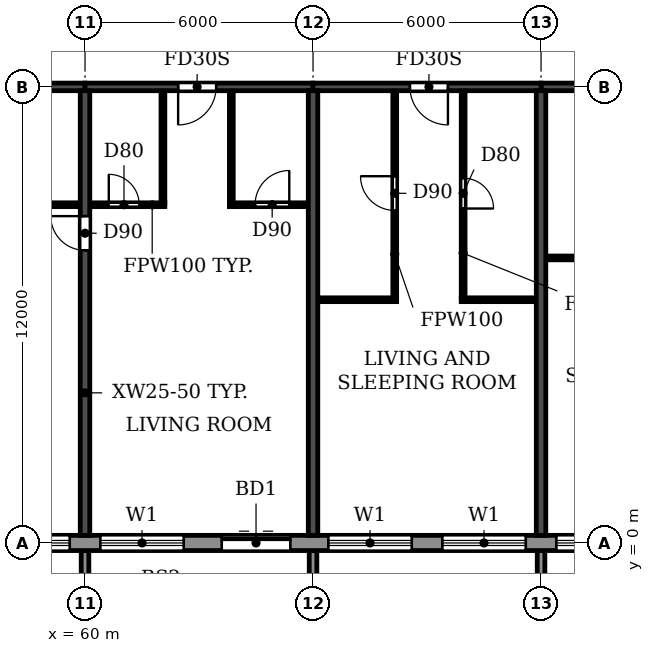
"""IFC4 building model, lengths in metres.
Left out: names, types, materials, properties, quantities, classifications, styles, units other than length and angle.
Written with IfcOpenShell. Run it as: python <this file> out.ifc"""

import sys

from ifc_helpers import new_model, si_unit, direction, frame, frame_2d, origin, place, context, subcontext, project, spatial, polyline, rectangle, outline, extrude, source, transform, mapped, element, fill, save


model = new_model("IFC4")
c1 = context("Model", 3, precision=1e-05, world=origin(), true_north=direction((0.0, 1.0)))
c2 = subcontext(c1, "Body", "Model", "MODEL_VIEW")
j1 = project(units=[si_unit("LENGTHUNIT", "METRE"), si_unit("PLANEANGLEUNIT", "RADIAN")], contexts=[c1])
p1 = place(None, origin())
s1 = spatial("IfcSite", under=j1, at=p1, CompositionType="ELEMENT")
p2 = place(p1, origin())
s2 = spatial("IfcBuilding", under=s1, at=p2, CompositionType="ELEMENT")
p3 = place(p2, frame((0.0, 0.0, 171.9)))
s3 = spatial("IfcBuildingStorey", under=s2, at=p3, CompositionType="ELEMENT", Elevation=171.9)
p4 = place(p3, frame((60.0, 0.2, 0.0), z_axis=(0.0, 0.0, 1.0), x_axis=(0.0, 1.0, 0.0)))
e1 = element("IfcWall", 1, at=p4, inside=s3, PredefinedType="SHEAR", context=c2, shape_type="SweptSolid", body=[
    extrude(rectangle(XDim=11.7, YDim=0.25, at=frame_2d((5.85, 0.0))), origin(), (0.0, 0.0, 1.0), 3.08),
])
p5 = place(p4, frame((7.5, 0.0, 0.0)))
e2 = element("IfcOpeningElement", 2, at=p5, cuts=e1, PredefinedType="OPENING", context=c2, shape_type="SweptSolid", body=[
    extrude(rectangle(XDim=0.9, YDim=2.1, at=frame_2d((0.45, 1.05))), frame((0.0, 0.135, 0.0), z_axis=(0.0, -1.0, 0.0), x_axis=(1.0, 0.0, 0.0)), (0.0, 0.0, 1.0), 0.27),
])
for number, where, z_axis, x_axis in (
    (3, (66.0, 0.2, 0.0), (0.0, 0.0, 1.0), (0.0, 1.0, 0.0)),
    (4, (72.0, 0.2, 0.0), (0.0, 0.0, 1.0), (0.0, 1.0, 0.0)),
):
    element("IfcWall", number, at=place(p3, frame(where, z_axis=z_axis, x_axis=x_axis)), inside=s3, PredefinedType="SHEAR", context=c2, shape_type="SweptSolid", body=[
        extrude(rectangle(XDim=11.7, YDim=0.25, at=frame_2d((5.85, 0.0))), origin(), (0.0, 0.0, 1.0), 3.08),
    ])
p6 = place(p3, frame((54.0, 12.0, 0.0), z_axis=(0.0, 0.0, 1.0), x_axis=(1.0, 0.0, 0.0)))
e5 = element("IfcWall", 5, at=p6, inside=s3, PredefinedType="SHEAR", context=c2, shape_type="SweptSolid", body=[
    extrude(rectangle(XDim=6.0, YDim=0.2, at=frame_2d((3.0, 0.0))), origin(), (0.0, 0.0, 1.0), 2.48),
])
p7 = place(p3, frame((60.0, 12.0, 0.0), z_axis=(0.0, 0.0, 1.0), x_axis=(1.0, 0.0, 0.0)))
e6 = element("IfcWall", 6, at=p7, inside=s3, PredefinedType="SHEAR", context=c2, shape_type="SweptSolid", body=[
    extrude(rectangle(XDim=6.0, YDim=0.2, at=frame_2d((3.0, 0.0))), origin(), (0.0, 0.0, 1.0), 2.48),
])
p8 = place(p7, frame((2.45, 0.0, 0.0)))
e7 = element("IfcOpeningElement", 7, at=p8, cuts=e6, PredefinedType="OPENING", context=c2, shape_type="SweptSolid", body=[
    extrude(rectangle(XDim=1.0, YDim=2.1, at=frame_2d((0.5, 1.05))), frame((0.0, 0.11, 0.0), z_axis=(0.0, -1.0, 0.0), x_axis=(1.0, 0.0, 0.0)), (0.0, 0.0, 1.0), 0.22),
])
p9 = place(p3, frame((66.0, 12.0, 0.0), z_axis=(0.0, 0.0, 1.0), x_axis=(1.0, 0.0, 0.0)))
e8 = element("IfcWall", 8, at=p9, inside=s3, PredefinedType="SHEAR", context=c2, shape_type="SweptSolid", body=[
    extrude(rectangle(XDim=6.0, YDim=0.2, at=frame_2d((3.0, 0.0))), origin(), (0.0, 0.0, 1.0), 2.48),
])
p10 = place(p9, frame((2.55, 0.0, 0.0)))
e9 = element("IfcOpeningElement", 9, at=p10, cuts=e8, PredefinedType="OPENING", context=c2, shape_type="SweptSolid", body=[
    extrude(rectangle(XDim=1.0, YDim=2.1, at=frame_2d((0.5, 1.05))), frame((0.0, 0.11, 0.0), z_axis=(0.0, -1.0, 0.0), x_axis=(1.0, 0.0, 0.0)), (0.0, 0.0, 1.0), 0.22),
])
p11 = place(p3, frame((72.0, 12.0, 0.0), z_axis=(0.0, 0.0, 1.0), x_axis=(1.0, 0.0, 0.0)))
e10 = element("IfcWall", 10, at=p11, inside=s3, PredefinedType="SHEAR", context=c2, shape_type="SweptSolid", body=[
    extrude(rectangle(XDim=6.0, YDim=0.2, at=frame_2d((3.0, 0.0))), origin(), (0.0, 0.0, 1.0), 2.48),
])
p12 = place(p11, frame((2.45, 0.0, 0.0)))
e11 = element("IfcOpeningElement", 11, at=p12, cuts=e10, PredefinedType="OPENING", context=c2, shape_type="SweptSolid", body=[
    extrude(rectangle(XDim=1.0, YDim=2.1, at=frame_2d((0.5, 1.05))), frame((0.0, 0.11, 0.0), z_axis=(0.0, -1.0, 0.0), x_axis=(1.0, 0.0, 0.0)), (0.0, 0.0, 1.0), 0.22),
])
p13 = place(p3, frame((22.683, 0.0, 0.0), z_axis=(0.0, 0.0, 1.0), x_axis=(1.0, 0.0, 0.0)))
e12 = element("IfcWall", 12, at=p13, inside=s3, PredefinedType="STANDARD", context=c2, shape_type="SweptSolid", body=[
    extrude(rectangle(XDim=56.634, YDim=0.4, at=frame_2d((28.317, 0.0))), origin(), (0.0, 0.0, 1.0), 3.08),
])
p14 = place(p13, frame((1.717, 0.0, 0.9)))
e13 = element("IfcOpeningElement", 13, at=p14, cuts=e12, PredefinedType="OPENING", context=c2, shape_type="SweptSolid", body=[
    extrude(rectangle(XDim=2.2, YDim=1.5, at=frame_2d((1.1, 0.75))), frame((0.0, 0.21, 0.0), z_axis=(0.0, -1.0, 0.0), x_axis=(1.0, 0.0, 0.0)), (0.0, 0.0, 1.0), 0.42),
])
p15 = place(p13, frame((4.917, 0.0, 0.0)))
e14 = element("IfcOpeningElement", 14, at=p15, cuts=e12, PredefinedType="OPENING", context=c2, shape_type="SweptSolid", body=[
    extrude(rectangle(XDim=1.8, YDim=2.4, at=frame_2d((0.9, 1.2))), frame((0.0, 0.21, 0.0), z_axis=(0.0, -1.0, 0.0), x_axis=(1.0, 0.0, 0.0)), (0.0, 0.0, 1.0), 0.42),
])
p16 = place(p13, frame((7.717, 0.0, 0.9)))
e15 = element("IfcOpeningElement", 15, at=p16, cuts=e12, PredefinedType="OPENING", context=c2, shape_type="SweptSolid", body=[
    extrude(rectangle(XDim=2.2, YDim=1.5, at=frame_2d((1.1, 0.75))), frame((0.0, 0.21, 0.0), z_axis=(0.0, -1.0, 0.0), x_axis=(1.0, 0.0, 0.0)), (0.0, 0.0, 1.0), 0.42),
])
p17 = place(p13, frame((10.717, 0.0, 0.9)))
e16 = element("IfcOpeningElement", 16, at=p17, cuts=e12, PredefinedType="OPENING", context=c2, shape_type="SweptSolid", body=[
    extrude(rectangle(XDim=2.2, YDim=1.5, at=frame_2d((1.1, 0.75))), frame((0.0, 0.21, 0.0), z_axis=(0.0, -1.0, 0.0), x_axis=(1.0, 0.0, 0.0)), (0.0, 0.0, 1.0), 0.42),
])
p18 = place(p13, frame((13.717, 0.0, 0.9)))
e17 = element("IfcOpeningElement", 17, at=p18, cuts=e12, PredefinedType="OPENING", context=c2, shape_type="SweptSolid", body=[
    extrude(rectangle(XDim=2.2, YDim=1.5, at=frame_2d((1.1, 0.75))), frame((0.0, 0.21, 0.0), z_axis=(0.0, -1.0, 0.0), x_axis=(1.0, 0.0, 0.0)), (0.0, 0.0, 1.0), 0.42),
])
p19 = place(p13, frame((16.917, 0.0, 0.0)))
e18 = element("IfcOpeningElement", 18, at=p19, cuts=e12, PredefinedType="OPENING", context=c2, shape_type="SweptSolid", body=[
    extrude(rectangle(XDim=1.8, YDim=2.4, at=frame_2d((0.9, 1.2))), frame((0.0, 0.21, 0.0), z_axis=(0.0, -1.0, 0.0), x_axis=(1.0, 0.0, 0.0)), (0.0, 0.0, 1.0), 0.42),
])
p20 = place(p13, frame((19.717, 0.0, 0.9)))
e19 = element("IfcOpeningElement", 19, at=p20, cuts=e12, PredefinedType="OPENING", context=c2, shape_type="SweptSolid", body=[
    extrude(rectangle(XDim=2.2, YDim=1.5, at=frame_2d((1.1, 0.75))), frame((0.0, 0.21, 0.0), z_axis=(0.0, -1.0, 0.0), x_axis=(1.0, 0.0, 0.0)), (0.0, 0.0, 1.0), 0.42),
])
p21 = place(p13, frame((22.717, 0.0, 0.9)))
e20 = element("IfcOpeningElement", 20, at=p21, cuts=e12, PredefinedType="OPENING", context=c2, shape_type="SweptSolid", body=[
    extrude(rectangle(XDim=2.2, YDim=1.5, at=frame_2d((1.1, 0.75))), frame((0.0, 0.21, 0.0), z_axis=(0.0, -1.0, 0.0), x_axis=(1.0, 0.0, 0.0)), (0.0, 0.0, 1.0), 0.42),
])
p22 = place(p13, frame((25.917, 0.0, 0.0)))
e21 = element("IfcOpeningElement", 21, at=p22, cuts=e12, PredefinedType="OPENING", context=c2, shape_type="SweptSolid", body=[
    extrude(rectangle(XDim=1.8, YDim=2.4, at=frame_2d((0.9, 1.2))), frame((0.0, 0.21, 0.0), z_axis=(0.0, -1.0, 0.0), x_axis=(1.0, 0.0, 0.0)), (0.0, 0.0, 1.0), 0.42),
])
p23 = place(p13, frame((28.717, 0.0, 0.9)))
e22 = element("IfcOpeningElement", 22, at=p23, cuts=e12, PredefinedType="OPENING", context=c2, shape_type="SweptSolid", body=[
    extrude(rectangle(XDim=2.2, YDim=1.5, at=frame_2d((1.1, 0.75))), frame((0.0, 0.21, 0.0), z_axis=(0.0, -1.0, 0.0), x_axis=(1.0, 0.0, 0.0)), (0.0, 0.0, 1.0), 0.42),
])
p24 = place(p13, frame((31.717, 0.0, 0.9)))
e23 = element("IfcOpeningElement", 23, at=p24, cuts=e12, PredefinedType="OPENING", context=c2, shape_type="SweptSolid", body=[
    extrude(rectangle(XDim=2.2, YDim=1.5, at=frame_2d((1.1, 0.75))), frame((0.0, 0.21, 0.0), z_axis=(0.0, -1.0, 0.0), x_axis=(1.0, 0.0, 0.0)), (0.0, 0.0, 1.0), 0.42),
])
p25 = place(p13, frame((34.717, 0.0, 0.9)))
e24 = element("IfcOpeningElement", 24, at=p25, cuts=e12, PredefinedType="OPENING", context=c2, shape_type="SweptSolid", body=[
    extrude(rectangle(XDim=2.2, YDim=1.5, at=frame_2d((1.1, 0.75))), frame((0.0, 0.21, 0.0), z_axis=(0.0, -1.0, 0.0), x_axis=(1.0, 0.0, 0.0)), (0.0, 0.0, 1.0), 0.42),
])
p26 = place(p13, frame((37.717, 0.0, 0.9)))
e25 = element("IfcOpeningElement", 25, at=p26, cuts=e12, PredefinedType="OPENING", context=c2, shape_type="SweptSolid", body=[
    extrude(rectangle(XDim=2.2, YDim=1.5, at=frame_2d((1.1, 0.75))), frame((0.0, 0.21, 0.0), z_axis=(0.0, -1.0, 0.0), x_axis=(1.0, 0.0, 0.0)), (0.0, 0.0, 1.0), 0.42),
])
p27 = place(p13, frame((40.917, 0.0, 0.0)))
e26 = element("IfcOpeningElement", 26, at=p27, cuts=e12, PredefinedType="OPENING", context=c2, shape_type="SweptSolid", body=[
    extrude(rectangle(XDim=1.8, YDim=2.4, at=frame_2d((0.9, 1.2))), frame((0.0, 0.21, 0.0), z_axis=(0.0, -1.0, 0.0), x_axis=(1.0, 0.0, 0.0)), (0.0, 0.0, 1.0), 0.42),
])
p28 = place(p13, frame((43.717, 0.0, 0.9)))
e27 = element("IfcOpeningElement", 27, at=p28, cuts=e12, PredefinedType="OPENING", context=c2, shape_type="SweptSolid", body=[
    extrude(rectangle(XDim=2.2, YDim=1.5, at=frame_2d((1.1, 0.75))), frame((0.0, 0.21, 0.0), z_axis=(0.0, -1.0, 0.0), x_axis=(1.0, 0.0, 0.0)), (0.0, 0.0, 1.0), 0.42),
])
p29 = place(p13, frame((46.717, 0.0, 0.9)))
e28 = element("IfcOpeningElement", 28, at=p29, cuts=e12, PredefinedType="OPENING", context=c2, shape_type="SweptSolid", body=[
    extrude(rectangle(XDim=2.2, YDim=1.5, at=frame_2d((1.1, 0.75))), frame((0.0, 0.21, 0.0), z_axis=(0.0, -1.0, 0.0), x_axis=(1.0, 0.0, 0.0)), (0.0, 0.0, 1.0), 0.42),
])
p30 = place(p13, frame((49.717, 0.0, 0.9)))
e29 = element("IfcOpeningElement", 29, at=p30, cuts=e12, PredefinedType="OPENING", context=c2, shape_type="SweptSolid", body=[
    extrude(rectangle(XDim=2.2, YDim=1.5, at=frame_2d((1.1, 0.75))), frame((0.0, 0.21, 0.0), z_axis=(0.0, -1.0, 0.0), x_axis=(1.0, 0.0, 0.0)), (0.0, 0.0, 1.0), 0.42),
])
p31 = place(p13, frame((52.917, 0.0, 0.0)))
e30 = element("IfcOpeningElement", 30, at=p31, cuts=e12, PredefinedType="OPENING", context=c2, shape_type="SweptSolid", body=[
    extrude(rectangle(XDim=1.8, YDim=2.4, at=frame_2d((0.9, 1.2))), frame((0.0, 0.21, 0.0), z_axis=(0.0, -1.0, 0.0), x_axis=(1.0, 0.0, 0.0)), (0.0, 0.0, 1.0), 0.42),
])
m1 = source(origin(), c2, "Body", "SweptSolid", [
    extrude(outline(polyline([(0.0, 0.0), (0.2, 0.0), (0.2, 1.65), (0.0, 1.65), (0.0, 0.0)])), origin(), (0.0, 0.0, 1.0), 3.1),
])
for number, where in (
    (31, (59.9, -1.85, 0.0)),
    (32, (65.9, -1.85, 0.0)),
    (33, (71.9, -1.85, 0.0)),
):
    element("IfcWall", number, at=place(p3, frame(where)), inside=s3, PredefinedType="STANDARD", context=c2, shape_type="MappedRepresentation", body=[
        mapped(m1, transform((0.0, 0.0, 0.0))),
    ])
p32 = place(p3, frame((66.135, 6.4, 0.0), z_axis=(0.0, 0.0, 1.0), x_axis=(1.0, 0.0, 0.0)))
e34 = element("IfcWall", 34, at=p32, inside=s3, PredefinedType="PARTITIONING", context=c2, shape_type="SweptSolid", body=[
    extrude(rectangle(XDim=2.065, YDim=0.1, at=frame_2d((1.032, 0.0))), origin(), (0.0, 0.0, 1.0), 3.08),
])
for number, where, z_axis, x_axis in (
    (35, (69.9, 6.4, 0.0), (0.0, 0.0, 1.0), (1.0, 0.0, 0.0)),
    (36, (72.135, 7.5, 0.0), (0.0, 0.0, 1.0), (1.0, 0.0, 0.0)),
):
    element("IfcWall", number, at=place(p3, frame(where, z_axis=z_axis, x_axis=x_axis)), inside=s3, PredefinedType="PARTITIONING", context=c2, shape_type="SweptSolid", body=[
        extrude(rectangle(XDim=1.965, YDim=0.1, at=frame_2d((0.982, 0.0))), origin(), (0.0, 0.0, 1.0), 3.08),
    ])
p33 = place(p3, frame((57.1, 8.9, 0.0), z_axis=(0.0, 0.0, 1.0), x_axis=(1.0, 0.0, 0.0)))
e37 = element("IfcWall", 37, at=p33, inside=s3, PredefinedType="PARTITIONING", context=c2, shape_type="SweptSolid", body=[
    extrude(rectangle(XDim=2.765, YDim=0.1, at=frame_2d((1.382, 0.0))), origin(), (0.0, 0.0, 1.0), 3.08),
])
p34 = place(p33, frame((1.0, 0.0, 0.0)))
e38 = element("IfcOpeningElement", 38, at=p34, cuts=e37, PredefinedType="OPENING", context=c2, shape_type="SweptSolid", body=[
    extrude(rectangle(XDim=0.8, YDim=2.1, at=frame_2d((0.4, 1.05))), frame((0.0, 0.06, 0.0), z_axis=(0.0, -1.0, 0.0), x_axis=(1.0, 0.0, 0.0)), (0.0, 0.0, 1.0), 0.12),
])
p35 = place(p3, frame((60.135, 8.9, 0.0), z_axis=(0.0, 0.0, 1.0), x_axis=(1.0, 0.0, 0.0)))
e39 = element("IfcWall", 39, at=p35, inside=s3, PredefinedType="PARTITIONING", context=c2, shape_type="SweptSolid", body=[
    extrude(rectangle(XDim=1.965, YDim=0.1, at=frame_2d((0.982, 0.0))), origin(), (0.0, 0.0, 1.0), 3.08),
])
p36 = place(p35, frame((0.49, 0.0, 0.0)))
e40 = element("IfcOpeningElement", 40, at=p36, cuts=e39, PredefinedType="OPENING", context=c2, shape_type="SweptSolid", body=[
    extrude(rectangle(XDim=0.8, YDim=2.1, at=frame_2d((0.4, 1.05))), frame((0.0, 0.06, 0.0), z_axis=(0.0, -1.0, 0.0), x_axis=(1.0, 0.0, 0.0)), (0.0, 0.0, 1.0), 0.12),
])
p37 = place(p3, frame((63.8, 8.9, 0.0), z_axis=(0.0, 0.0, 1.0), x_axis=(1.0, 0.0, 0.0)))
e41 = element("IfcWall", 41, at=p37, inside=s3, PredefinedType="PARTITIONING", context=c2, shape_type="SweptSolid", body=[
    extrude(rectangle(XDim=2.065, YDim=0.1, at=frame_2d((1.032, 0.0))), origin(), (0.0, 0.0, 1.0), 3.08),
])
p38 = place(p37, frame((0.675, 0.0, 0.0)))
e42 = element("IfcOpeningElement", 42, at=p38, cuts=e41, PredefinedType="OPENING", context=c2, shape_type="SweptSolid", body=[
    extrude(rectangle(XDim=0.9, YDim=2.1, at=frame_2d((0.45, 1.05))), frame((0.0, 0.06, 0.0), z_axis=(0.0, -1.0, 0.0), x_axis=(1.0, 0.0, 0.0)), (0.0, 0.0, 1.0), 0.12),
])
for number, where, z_axis, x_axis in (
    (43, (62.05, 8.95, 0.0), (0.0, 0.0, 1.0), (0.0, 1.0, 0.0)),
    (44, (63.85, 8.95, 0.0), (0.0, 0.0, 1.0), (0.0, 1.0, 0.0)),
):
    element("IfcWall", number, at=place(p3, frame(where, z_axis=z_axis, x_axis=x_axis)), inside=s3, PredefinedType="PARTITIONING", context=c2, shape_type="SweptSolid", body=[
        extrude(rectangle(XDim=2.94, YDim=0.1, at=frame_2d((1.47, 0.0))), origin(), (0.0, 0.0, 1.0), 3.08),
    ])
p39 = place(p3, frame((68.15, 6.45, 0.0), z_axis=(0.0, 0.0, 1.0), x_axis=(0.0, 1.0, 0.0)))
e45 = element("IfcWall", 45, at=p39, inside=s3, PredefinedType="PARTITIONING", context=c2, shape_type="SweptSolid", body=[
    extrude(rectangle(XDim=5.44, YDim=0.1, at=frame_2d((2.72, 0.0))), origin(), (0.0, 0.0, 1.0), 3.08),
])
p40 = place(p39, frame((2.3, 0.0, 0.0)))
e46 = element("IfcOpeningElement", 46, at=p40, cuts=e45, PredefinedType="OPENING", context=c2, shape_type="SweptSolid", body=[
    extrude(rectangle(XDim=0.9, YDim=2.1, at=frame_2d((0.45, 1.05))), frame((0.0, 0.06, 0.0), z_axis=(0.0, -1.0, 0.0), x_axis=(1.0, 0.0, 0.0)), (0.0, 0.0, 1.0), 0.12),
])
p41 = place(p3, frame((69.95, 6.45, 0.0), z_axis=(0.0, 0.0, 1.0), x_axis=(0.0, 1.0, 0.0)))
e47 = element("IfcWall", 47, at=p41, inside=s3, PredefinedType="PARTITIONING", context=c2, shape_type="SweptSolid", body=[
    extrude(rectangle(XDim=5.44, YDim=0.1, at=frame_2d((2.72, 0.0))), origin(), (0.0, 0.0, 1.0), 3.08),
])
p42 = place(p41, frame((2.35, 0.0, 0.0)))
e48 = element("IfcOpeningElement", 48, at=p42, cuts=e47, PredefinedType="OPENING", context=c2, shape_type="SweptSolid", body=[
    extrude(rectangle(XDim=0.8, YDim=2.1, at=frame_2d((0.4, 1.05))), frame((0.0, 0.06, 0.0), z_axis=(0.0, -1.0, 0.0), x_axis=(1.0, 0.0, 0.0)), (0.0, 0.0, 1.0), 0.12),
])
p43 = place(p25, origin())
e49 = element("IfcWindow", 49, at=p43, inside=s3, PartitioningType="DOUBLE_PANEL_HORIZONTAL", PredefinedType="WINDOW", context=c2, shape_type="SweptSolid", body=[
    extrude(rectangle(XDim=2.2, YDim=1.5, at=frame_2d((1.1, 0.75))), frame((0.0, 0.03, 0.0), z_axis=(0.0, -1.0, 0.0), x_axis=(1.0, 0.0, 0.0)), (0.0, 0.0, 1.0), 0.06),
])
fill(e24, e49)
p44 = place(p26, origin())
e50 = element("IfcWindow", 50, at=p44, inside=s3, PartitioningType="DOUBLE_PANEL_HORIZONTAL", PredefinedType="WINDOW", context=c2, shape_type="SweptSolid", body=[
    extrude(rectangle(XDim=2.2, YDim=1.5, at=frame_2d((1.1, 0.75))), frame((0.0, 0.03, 0.0), z_axis=(0.0, -1.0, 0.0), x_axis=(1.0, 0.0, 0.0)), (0.0, 0.0, 1.0), 0.06),
])
fill(e25, e50)
p45 = place(p27, origin())
e51 = element("IfcDoor", 51, at=p45, inside=s3, OperationType="DOUBLE_DOOR_SLIDING", PredefinedType="DOOR", context=c2, shape_type="SweptSolid", body=[
    extrude(rectangle(XDim=1.8, YDim=2.4, at=frame_2d((0.9, 1.2))), frame((0.0, 0.025, 0.0), z_axis=(0.0, -1.0, 0.0), x_axis=(1.0, 0.0, 0.0)), (0.0, 0.0, 1.0), 0.05),
])
fill(e26, e51)
p46 = place(p28, origin())
e52 = element("IfcWindow", 52, at=p46, inside=s3, PartitioningType="DOUBLE_PANEL_HORIZONTAL", PredefinedType="WINDOW", context=c2, shape_type="SweptSolid", body=[
    extrude(rectangle(XDim=2.2, YDim=1.5, at=frame_2d((1.1, 0.75))), frame((0.0, 0.03, 0.0), z_axis=(0.0, -1.0, 0.0), x_axis=(1.0, 0.0, 0.0)), (0.0, 0.0, 1.0), 0.06),
])
fill(e27, e52)
p47 = place(p29, origin())
e53 = element("IfcWindow", 53, at=p47, inside=s3, PartitioningType="DOUBLE_PANEL_HORIZONTAL", PredefinedType="WINDOW", context=c2, shape_type="SweptSolid", body=[
    extrude(rectangle(XDim=2.2, YDim=1.5, at=frame_2d((1.1, 0.75))), frame((0.0, 0.03, 0.0), z_axis=(0.0, -1.0, 0.0), x_axis=(1.0, 0.0, 0.0)), (0.0, 0.0, 1.0), 0.06),
])
fill(e28, e53)
p48 = place(p30, origin())
e54 = element("IfcWindow", 54, at=p48, inside=s3, PartitioningType="DOUBLE_PANEL_HORIZONTAL", PredefinedType="WINDOW", context=c2, shape_type="SweptSolid", body=[
    extrude(rectangle(XDim=2.2, YDim=1.5, at=frame_2d((1.1, 0.75))), frame((0.0, 0.03, 0.0), z_axis=(0.0, -1.0, 0.0), x_axis=(1.0, 0.0, 0.0)), (0.0, 0.0, 1.0), 0.06),
])
fill(e29, e54)
p49 = place(p5, origin())
e55 = element("IfcDoor", 55, at=p49, inside=s3, OperationType="SINGLE_SWING_RIGHT", PredefinedType="DOOR", context=c2, shape_type="SweptSolid", body=[
    extrude(rectangle(XDim=0.9, YDim=2.1, at=frame_2d((0.45, 1.05))), frame((0.0, 0.025, 0.0), z_axis=(0.0, -1.0, 0.0), x_axis=(1.0, 0.0, 0.0)), (0.0, 0.0, 1.0), 0.05),
])
fill(e2, e55)
p50 = place(p36, origin())
e56 = element("IfcDoor", 56, at=p50, inside=s3, OperationType="SINGLE_SWING_LEFT", PredefinedType="DOOR", context=c2, shape_type="SweptSolid", body=[
    extrude(rectangle(XDim=0.8, YDim=2.1, at=frame_2d((0.4, 1.05))), frame((0.0, 0.025, 0.0), z_axis=(0.0, -1.0, 0.0), x_axis=(1.0, 0.0, 0.0)), (0.0, 0.0, 1.0), 0.05),
])
fill(e40, e56)
p51 = place(p8, frame((1.0, 0.0, 0.0), z_axis=(0.0, 0.0, 1.0), x_axis=(-1.0, 0.0, 0.0)))
e57 = element("IfcDoor", 57, at=p51, inside=s3, OperationType="SINGLE_SWING_RIGHT", PredefinedType="DOOR", context=c2, shape_type="SweptSolid", body=[
    extrude(rectangle(XDim=1.0, YDim=2.1, at=frame_2d((0.5, 1.05))), frame((0.0, 0.025, 0.0), z_axis=(0.0, -1.0, 0.0), x_axis=(1.0, 0.0, 0.0)), (0.0, 0.0, 1.0), 0.05),
])
fill(e7, e57)
p52 = place(p38, origin())
e58 = element("IfcDoor", 58, at=p52, inside=s3, OperationType="SINGLE_SWING_RIGHT", PredefinedType="DOOR", context=c2, shape_type="SweptSolid", body=[
    extrude(rectangle(XDim=0.9, YDim=2.1, at=frame_2d((0.45, 1.05))), frame((0.0, 0.025, 0.0), z_axis=(0.0, -1.0, 0.0), x_axis=(1.0, 0.0, 0.0)), (0.0, 0.0, 1.0), 0.05),
])
fill(e42, e58)
p53 = place(p40, origin())
e59 = element("IfcDoor", 59, at=p53, inside=s3, OperationType="SINGLE_SWING_RIGHT", PredefinedType="DOOR", context=c2, shape_type="SweptSolid", body=[
    extrude(rectangle(XDim=0.9, YDim=2.1, at=frame_2d((0.45, 1.05))), frame((0.0, 0.025, 0.0), z_axis=(0.0, -1.0, 0.0), x_axis=(1.0, 0.0, 0.0)), (0.0, 0.0, 1.0), 0.05),
])
fill(e46, e59)
p54 = place(p10, frame((1.0, 0.0, 0.0), z_axis=(0.0, 0.0, 1.0), x_axis=(-1.0, 0.0, 0.0)))
e60 = element("IfcDoor", 60, at=p54, inside=s3, OperationType="SINGLE_SWING_LEFT", PredefinedType="DOOR", context=c2, shape_type="SweptSolid", body=[
    extrude(rectangle(XDim=1.0, YDim=2.1, at=frame_2d((0.5, 1.05))), frame((0.0, 0.025, 0.0), z_axis=(0.0, -1.0, 0.0), x_axis=(1.0, 0.0, 0.0)), (0.0, 0.0, 1.0), 0.05),
])
fill(e9, e60)
p55 = place(p42, frame((0.8, 0.0, 0.0), z_axis=(0.0, 0.0, 1.0), x_axis=(-1.0, 0.0, 0.0)))
e61 = element("IfcDoor", 61, at=p55, inside=s3, OperationType="SINGLE_SWING_RIGHT", PredefinedType="DOOR", context=c2, shape_type="SweptSolid", body=[
    extrude(rectangle(XDim=0.8, YDim=2.1, at=frame_2d((0.4, 1.05))), frame((0.0, 0.025, 0.0), z_axis=(0.0, -1.0, 0.0), x_axis=(1.0, 0.0, 0.0)), (0.0, 0.0, 1.0), 0.05),
])
fill(e48, e61)
save(model, sys.argv[1])
